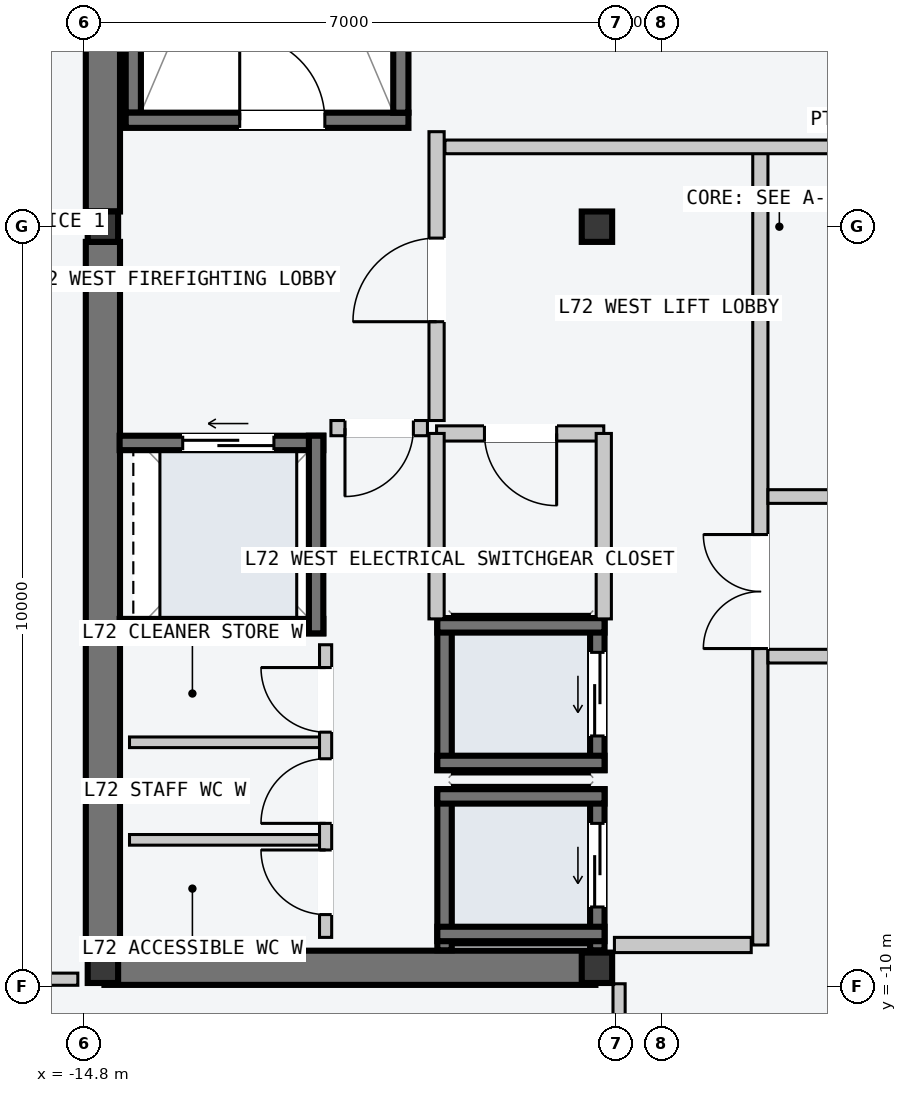
"""IFC4 building model, lengths in metres.
Left out: names, types, materials, properties, quantities, classifications, styles, units other than length and angle.
Written with IfcOpenShell. Run it as: python <this file> out.ifc"""

import sys

from ifc_helpers import new_model, si_unit, direction, frame, frame_2d, origin, origin_2d, place, context, subcontext, project, spatial, rectangle, i_section, extrude, element, fill, save


model = new_model("IFC4")
c1 = context("Model", 3, precision=1e-05, world=origin(), true_north=direction((0.0, 1.0)))
c2 = subcontext(c1, "Body", "Model", "MODEL_VIEW")
j1 = project(units=[si_unit("LENGTHUNIT", "METRE"), si_unit("PLANEANGLEUNIT", "RADIAN")], contexts=[c1])
p1 = place(None, origin())
s1 = spatial("IfcSite", under=j1, at=p1, CompositionType="ELEMENT")
p2 = place(p1, origin())
s2 = spatial("IfcBuilding", under=s1, at=p2, CompositionType="ELEMENT")
p3 = place(p2, frame((0.0, 0.0, 272.4)))
s3 = spatial("IfcBuildingStorey", under=s2, at=p3, CompositionType="ELEMENT", Elevation=272.4)
p4 = place(p3, frame((-14.53, -9.75, -0.2), z_axis=(0.0, 0.0, 1.0), x_axis=(1.0, 0.0, 0.0)))
e1 = element("IfcWall", 1, at=p4, inside=s3, PredefinedType="SHEAR", context=c2, shape_type="SweptSolid", body=[
    extrude(rectangle(XDim=6.46, YDim=0.45, at=frame_2d((3.23, 0.0))), origin(), (0.0, 0.0, 1.0), 3.6),
])
for number, where, z_axis, x_axis in (
    (2, (-14.55, -9.55, -0.2), (0.0, 0.0, 1.0), (0.0, 1.0, 0.0)),
    (3, (-14.55, 0.2, -0.2), (0.0, 0.0, 1.0), (0.0, 1.0, 0.0)),
):
    element("IfcWall", number, at=place(p3, frame(where, z_axis=z_axis, x_axis=x_axis)), inside=s3, PredefinedType="SHEAR", context=c2, shape_type="SweptSolid", body=[
        extrude(rectangle(XDim=9.35, YDim=0.45, at=frame_2d((4.675, 0.0))), origin(), (0.0, 0.0, 1.0), 3.6),
    ])
p5 = place(p3, frame((-14.15, 1.5, -0.2), z_axis=(0.0, 0.0, 1.0), x_axis=(0.0, 1.0, 0.0)))
e4 = element("IfcWall", 4, at=p5, inside=s3, PredefinedType="SOLIDWALL", context=c2, shape_type="SweptSolid", body=[
    extrude(rectangle(XDim=7.8, YDim=0.2, at=frame_2d((3.9, 0.0))), origin(), (0.0, 0.0, 1.0), 3.6),
])
p6 = place(p3, frame((-14.25, 1.4, -0.2), z_axis=(0.0, 0.0, 1.0), x_axis=(1.0, 0.0, 0.0)))
e5 = element("IfcWall", 5, at=p6, inside=s3, PredefinedType="SOLIDWALL", context=c2, shape_type="SweptSolid", body=[
    extrude(rectangle(XDim=3.72, YDim=0.2, at=frame_2d((1.86, 0.0))), origin(), (0.0, 0.0, 1.0), 3.6),
])
p7 = place(p6, frame((1.5, 0.0, 0.2)))
e6 = element("IfcOpeningElement", 6, at=p7, cuts=e5, PredefinedType="OPENING", context=c2, shape_type="SweptSolid", body=[
    extrude(rectangle(XDim=1.12, YDim=2.18, at=frame_2d((0.56, 1.09))), frame((0.0, 0.11, 0.0), z_axis=(0.0, -1.0, 0.0), x_axis=(1.0, 0.0, 0.0)), (0.0, 0.0, 1.0), 0.22),
])
p8 = place(p3, frame((-10.63, 1.5, -0.2), z_axis=(0.0, 0.0, 1.0), x_axis=(0.0, 1.0, 0.0)))
e7 = element("IfcWall", 7, at=p8, inside=s3, PredefinedType="SOLIDWALL", context=c2, shape_type="SweptSolid", body=[
    extrude(rectangle(XDim=7.8, YDim=0.2, at=frame_2d((3.9, 0.0))), origin(), (0.0, 0.0, 1.0), 3.6),
])
for number, where, z_axis, x_axis in (
    (8, (-14.55, -9.75, 0.0), (0.0, 0.0, 1.0), (1.0, 0.0, 0.0)),
    (9, (-14.55, 0.0, 0.0), (0.0, 0.0, 1.0), (1.0, 0.0, 0.0)),
    (10, (-8.05, -9.75, 0.0), (0.0, 0.0, 1.0), (1.0, 0.0, 0.0)),
    (11, (-8.05, 0.0, 0.0), (0.0, 0.0, 1.0), (1.0, 0.0, 0.0)),
):
    element("IfcColumn", number, at=place(p3, frame(where, z_axis=z_axis, x_axis=x_axis)), inside=s3, PredefinedType="COLUMN", context=c2, shape_type="SweptSolid", body=[
        extrude(i_section(OverallWidth=0.4, OverallDepth=0.4, WebThickness=0.013, FlangeThickness=0.021, at=origin_2d()), origin(), (0.0, 0.0, 1.0), 3.6),
    ])
p9 = place(p3, frame((-8.045, -9.52, -0.2), z_axis=(0.0, 0.0, 1.0), x_axis=(0.0, 1.0, 0.0)))
e12 = element("IfcWall", 12, at=p9, inside=s3, PredefinedType="SOLIDWALL", context=c2, shape_type="SweptSolid", body=[
    extrude(rectangle(XDim=2.12, YDim=0.19, at=frame_2d((1.06, 0.0))), origin(), (0.0, 0.0, 1.0), 3.6),
])
p10 = place(p9, frame((0.57, 0.0, 0.2)))
e13 = element("IfcOpeningElement", 13, at=p10, cuts=e12, PredefinedType="OPENING", context=c2, shape_type="SweptSolid", body=[
    extrude(rectangle(XDim=1.1, YDim=2.2, at=frame_2d((0.55, 1.1))), frame((0.0, 0.105, 0.0), z_axis=(0.0, -1.0, 0.0), x_axis=(1.0, 0.0, 0.0)), (0.0, 0.0, 1.0), 0.21),
])
p11 = place(p3, frame((-10.055, -9.52, -0.2), z_axis=(0.0, 0.0, 1.0), x_axis=(0.0, 1.0, 0.0)))
e14 = element("IfcWall", 14, at=p11, inside=s3, PredefinedType="SOLIDWALL", context=c2, shape_type="SweptSolid", body=[
    extrude(rectangle(XDim=2.12, YDim=0.19, at=frame_2d((1.06, 0.0))), origin(), (0.0, 0.0, 1.0), 3.6),
])
for number, where, z_axis, x_axis in (
    (15, (-10.15, -7.495, -0.2), (0.0, 0.0, 1.0), (1.0, 0.0, 0.0)),
    (16, (-10.15, -9.305, -0.2), (0.0, 0.0, 1.0), (1.0, 0.0, 0.0)),
):
    element("IfcWall", number, at=place(p3, frame(where, z_axis=z_axis, x_axis=x_axis)), inside=s3, PredefinedType="SOLIDWALL", context=c2, shape_type="SweptSolid", body=[
        extrude(rectangle(XDim=2.2, YDim=0.19, at=frame_2d((1.1, 0.0))), origin(), (0.0, 0.0, 1.0), 3.6),
    ])
p12 = place(p3, frame((-8.045, -7.15, -0.2), z_axis=(0.0, 0.0, 1.0), x_axis=(0.0, 1.0, 0.0)))
e17 = element("IfcWall", 17, at=p12, inside=s3, PredefinedType="SOLIDWALL", context=c2, shape_type="SweptSolid", body=[
    extrude(rectangle(XDim=2.0, YDim=0.19, at=frame_2d((1.0, 0.0))), origin(), (0.0, 0.0, 1.0), 3.6),
])
p13 = place(p12, frame((0.45, 0.0, 0.2)))
e18 = element("IfcOpeningElement", 18, at=p13, cuts=e17, PredefinedType="OPENING", context=c2, shape_type="SweptSolid", body=[
    extrude(rectangle(XDim=1.1, YDim=2.2, at=frame_2d((0.55, 1.1))), frame((0.0, 0.105, 0.0), z_axis=(0.0, -1.0, 0.0), x_axis=(1.0, 0.0, 0.0)), (0.0, 0.0, 1.0), 0.21),
])
p14 = place(p3, frame((-10.055, -7.15, -0.2), z_axis=(0.0, 0.0, 1.0), x_axis=(0.0, 1.0, 0.0)))
e19 = element("IfcWall", 19, at=p14, inside=s3, PredefinedType="SOLIDWALL", context=c2, shape_type="SweptSolid", body=[
    extrude(rectangle(XDim=2.0, YDim=0.19, at=frame_2d((1.0, 0.0))), origin(), (0.0, 0.0, 1.0), 3.6),
])
for number, where, z_axis, x_axis in (
    (20, (-10.15, -5.245, -0.2), (0.0, 0.0, 1.0), (1.0, 0.0, 0.0)),
    (21, (-10.15, -7.055, -0.2), (0.0, 0.0, 1.0), (1.0, 0.0, 0.0)),
):
    element("IfcWall", number, at=place(p3, frame(where, z_axis=z_axis, x_axis=x_axis)), inside=s3, PredefinedType="SOLIDWALL", context=c2, shape_type="SweptSolid", body=[
        extrude(rectangle(XDim=2.2, YDim=0.19, at=frame_2d((1.1, 0.0))), origin(), (0.0, 0.0, 1.0), 3.6),
    ])
p15 = place(p3, frame((-14.33, -2.845, -0.2), z_axis=(0.0, 0.0, 1.0), x_axis=(1.0, 0.0, 0.0)))
e22 = element("IfcWall", 22, at=p15, inside=s3, PredefinedType="SOLIDWALL", context=c2, shape_type="SweptSolid", body=[
    extrude(rectangle(XDim=2.68, YDim=0.19, at=frame_2d((1.34, 0.0))), origin(), (0.0, 0.0, 1.0), 3.6),
])
p16 = place(p15, frame((0.83, 0.0, 0.2)))
e23 = element("IfcOpeningElement", 23, at=p16, cuts=e22, PredefinedType="OPENING", context=c2, shape_type="SweptSolid", body=[
    extrude(rectangle(XDim=1.2, YDim=2.2, at=frame_2d((0.6, 1.1))), frame((0.0, 0.105, 0.0), z_axis=(0.0, -1.0, 0.0), x_axis=(1.0, 0.0, 0.0)), (0.0, 0.0, 1.0), 0.21),
])
p17 = place(p3, frame((-14.33, -5.255, -0.2), z_axis=(0.0, 0.0, 1.0), x_axis=(1.0, 0.0, 0.0)))
e24 = element("IfcWall", 24, at=p17, inside=s3, PredefinedType="SOLIDWALL", context=c2, shape_type="SweptSolid", body=[
    extrude(rectangle(XDim=2.68, YDim=0.19, at=frame_2d((1.34, 0.0))), origin(), (0.0, 0.0, 1.0), 3.6),
])
p18 = place(p3, frame((-11.745, -5.35, -0.2), z_axis=(0.0, 0.0, 1.0), x_axis=(0.0, 1.0, 0.0)))
e25 = element("IfcWall", 25, at=p18, inside=s3, PredefinedType="SOLIDWALL", context=c2, shape_type="SweptSolid", body=[
    extrude(rectangle(XDim=2.6, YDim=0.19, at=frame_2d((1.3, 0.0))), origin(), (0.0, 0.0, 1.0), 3.6),
])
p19 = place(p3, frame((-5.9, -9.45, 0.0), z_axis=(0.0, 0.0, 1.0), x_axis=(0.0, 1.0, 0.0)))
e26 = element("IfcWall", 26, at=p19, inside=s3, PredefinedType="PARTITIONING", context=c2, shape_type="SweptSolid", body=[
    extrude(rectangle(XDim=10.5, YDim=0.2, at=frame_2d((5.25, 0.0))), origin(), (0.0, 0.0, 1.0), 3.4),
])
p20 = place(p19, frame((3.9, 0.0, 0.0)))
e27 = element("IfcOpeningElement", 27, at=p20, cuts=e26, PredefinedType="OPENING", context=c2, shape_type="SweptSolid", body=[
    extrude(rectangle(XDim=1.5, YDim=2.2, at=frame_2d((0.75, 1.1))), frame((0.0, 0.11, 0.0), z_axis=(0.0, -1.0, 0.0), x_axis=(1.0, 0.0, 0.0)), (0.0, 0.0, 1.0), 0.22),
])
p21 = place(p3, frame((-6.02, -9.45, 0.0), z_axis=(0.0, 0.0, 1.0), x_axis=(-1.0, 0.0, 0.0)))
e28 = element("IfcWall", 28, at=p21, inside=s3, PredefinedType="PARTITIONING", context=c2, shape_type="SweptSolid", body=[
    extrude(rectangle(XDim=1.8, YDim=0.2, at=frame_2d((0.9, 0.0))), origin(), (0.0, 0.0, 1.0), 3.4),
])
p22 = place(p3, frame((-10.16, -2.55, 0.0), z_axis=(0.0, 0.0, 1.0), x_axis=(0.0, 1.0, 0.0)))
e29 = element("IfcWall", 29, at=p22, inside=s3, PredefinedType="PARTITIONING", context=c2, shape_type="SweptSolid", body=[
    extrude(rectangle(XDim=3.8, YDim=0.2, at=frame_2d((1.9, 0.0))), origin(), (0.0, 0.0, 1.0), 3.4),
])
p23 = place(p22, frame((1.3, 0.0, 0.0)))
e30 = element("IfcOpeningElement", 30, at=p23, cuts=e29, PredefinedType="OPENING", context=c2, shape_type="SweptSolid", body=[
    extrude(rectangle(XDim=1.1, YDim=2.15, at=frame_2d((0.55, 1.075))), frame((0.0, 0.11, 0.0), z_axis=(0.0, -1.0, 0.0), x_axis=(1.0, 0.0, 0.0)), (0.0, 0.0, 1.0), 0.22),
])
p24 = place(p3, frame((-10.28, -2.65, 0.0), z_axis=(0.0, 0.0, 1.0), x_axis=(-1.0, 0.0, 0.0)))
e31 = element("IfcWall", 31, at=p24, inside=s3, PredefinedType="PARTITIONING", context=c2, shape_type="SweptSolid", body=[
    extrude(rectangle(XDim=1.27, YDim=0.2, at=frame_2d((0.635, 0.0))), origin(), (0.0, 0.0, 1.0), 3.4),
])
p25 = place(p24, frame((0.185, 0.0, 0.0)))
e32 = element("IfcOpeningElement", 32, at=p25, cuts=e31, PredefinedType="OPENING", context=c2, shape_type="SweptSolid", body=[
    extrude(rectangle(XDim=0.9, YDim=2.15, at=frame_2d((0.45, 1.075))), frame((0.0, 0.11, 0.0), z_axis=(0.0, -1.0, 0.0), x_axis=(1.0, 0.0, 0.0)), (0.0, 0.0, 1.0), 0.22),
])
p26 = place(p3, frame((-7.96, -2.72, 0.0), z_axis=(0.0, 0.0, 1.0), x_axis=(-1.0, 0.0, 0.0)))
e33 = element("IfcWall", 33, at=p26, inside=s3, PredefinedType="PARTITIONING", context=c2, shape_type="SweptSolid", body=[
    extrude(rectangle(XDim=2.2, YDim=0.2, at=frame_2d((1.1, 0.0))), origin(), (0.0, 0.0, 1.0), 3.4),
])
p27 = place(p26, frame((0.62, 0.0, 0.0)))
e34 = element("IfcOpeningElement", 34, at=p27, cuts=e33, PredefinedType="OPENING", context=c2, shape_type="SweptSolid", body=[
    extrude(rectangle(XDim=0.95, YDim=2.1, at=frame_2d((0.475, 1.05))), frame((0.0, 0.11, 0.0), z_axis=(0.0, -1.0, 0.0), x_axis=(1.0, 0.0, 0.0)), (0.0, 0.0, 1.0), 0.22),
])
for number, where, z_axis, x_axis in (
    (35, (-7.96, -5.16, 0.0), (0.0, 0.0, 1.0), (0.0, 1.0, 0.0)),
    (36, (-10.16, -5.16, 0.0), (0.0, 0.0, 1.0), (0.0, 1.0, 0.0)),
):
    element("IfcWall", number, at=place(p3, frame(where, z_axis=z_axis, x_axis=x_axis)), inside=s3, PredefinedType="PARTITIONING", context=c2, shape_type="SweptSolid", body=[
        extrude(rectangle(XDim=2.44, YDim=0.2, at=frame_2d((1.22, 0.0))), origin(), (0.0, 0.0, 1.0), 3.4),
    ])
for number, where, z_axis, x_axis in (
    (37, (-11.7, -8.067, 0.0), (0.0, 0.0, 1.0), (-1.0, 0.0, 0.0)),
    (38, (-11.7, -6.783, 0.0), (0.0, 0.0, 1.0), (-1.0, 0.0, 0.0)),
):
    element("IfcWall", number, at=place(p3, frame(where, z_axis=z_axis, x_axis=x_axis)), inside=s3, PredefinedType="PARTITIONING", context=c2, shape_type="SweptSolid", body=[
        extrude(rectangle(XDim=2.5, YDim=0.14, at=frame_2d((1.25, 0.0))), origin(), (0.0, 0.0, 1.0), 3.4),
    ])
p28 = place(p3, frame((-11.62, -9.35, 0.0), z_axis=(0.0, 0.0, 1.0), x_axis=(0.0, 1.0, 0.0)))
e39 = element("IfcWall", 39, at=p28, inside=s3, PredefinedType="PARTITIONING", context=c2, shape_type="SweptSolid", body=[
    extrude(rectangle(XDim=3.85, YDim=0.16, at=frame_2d((1.925, 0.0))), origin(), (0.0, 0.0, 1.0), 3.4),
])
p29 = place(p28, frame((0.3, 0.0, 0.0)))
e40 = element("IfcOpeningElement", 40, at=p29, cuts=e39, PredefinedType="OPENING", context=c2, shape_type="SweptSolid", body=[
    extrude(rectangle(XDim=0.85, YDim=2.12, at=frame_2d((0.425, 1.06))), frame((0.0, 0.09, 0.0), z_axis=(0.0, -1.0, 0.0), x_axis=(1.0, 0.0, 0.0)), (0.0, 0.0, 1.0), 0.18),
])
p30 = place(p28, frame((1.5, 0.0, 0.0)))
e41 = element("IfcOpeningElement", 41, at=p30, cuts=e39, PredefinedType="OPENING", context=c2, shape_type="SweptSolid", body=[
    extrude(rectangle(XDim=0.85, YDim=2.12, at=frame_2d((0.425, 1.06))), frame((0.0, 0.09, 0.0), z_axis=(0.0, -1.0, 0.0), x_axis=(1.0, 0.0, 0.0)), (0.0, 0.0, 1.0), 0.18),
])
p31 = place(p28, frame((2.7, 0.0, 0.0)))
e42 = element("IfcOpeningElement", 42, at=p31, cuts=e39, PredefinedType="OPENING", context=c2, shape_type="SweptSolid", body=[
    extrude(rectangle(XDim=0.85, YDim=2.12, at=frame_2d((0.425, 1.06))), frame((0.0, 0.09, 0.0), z_axis=(0.0, -1.0, 0.0), x_axis=(1.0, 0.0, 0.0)), (0.0, 0.0, 1.0), 0.18),
])
p32 = place(p3, frame((-10.05, 1.05, 0.0), z_axis=(0.0, 0.0, 1.0), x_axis=(1.0, 0.0, 0.0)))
e43 = element("IfcWall", 43, at=p32, inside=s3, PredefinedType="PARTITIONING", context=c2, shape_type="SweptSolid", body=[
    extrude(rectangle(XDim=10.54, YDim=0.18, at=frame_2d((5.27, 0.0))), origin(), (0.0, 0.0, 1.0), 3.4),
])
for number, where, z_axis, x_axis in (
    (44, (-5.8, -3.55, 0.0), (0.0, 0.0, 1.0), (1.0, 0.0, 0.0)),
    (45, (-5.8, -5.65, 0.0), (0.0, 0.0, 1.0), (1.0, 0.0, 0.0)),
):
    element("IfcWall", number, at=place(p3, frame(where, z_axis=z_axis, x_axis=x_axis)), inside=s3, PredefinedType="PARTITIONING", context=c2, shape_type="SweptSolid", body=[
        extrude(rectangle(XDim=6.29, YDim=0.18, at=frame_2d((3.145, 0.0))), origin(), (0.0, 0.0, 1.0), 3.4),
    ])
p33 = place(p3, frame((-7.759, -17.56, 0.0), z_axis=(0.0, 0.0, 1.0), x_axis=(0.0, 1.0, 0.0)))
e46 = element("IfcWall", 46, at=p33, inside=s3, PredefinedType="PARTITIONING", context=c2, shape_type="SweptSolid", body=[
    extrude(rectangle(XDim=7.6, YDim=0.16, at=frame_2d((3.8, 0.0))), origin(), (0.0, 0.0, 1.0), 3.4),
])
p34 = place(p33, frame((1.34, 0.0, 0.0)))
e47 = element("IfcOpeningElement", 47, at=p34, cuts=e46, PredefinedType="OPENING", context=c2, shape_type="SweptSolid", body=[
    extrude(rectangle(XDim=0.96, YDim=2.18, at=frame_2d((0.48, 1.09))), frame((0.0, 0.09, 0.0), z_axis=(0.0, -1.0, 0.0), x_axis=(1.0, 0.0, 0.0)), (0.0, 0.0, 1.0), 0.18),
])
p35 = place(p3, frame((-18.56, -9.9, 0.0), z_axis=(0.0, 0.0, 1.0), x_axis=(1.0, 0.0, 0.0)))
e48 = element("IfcWall", 48, at=p35, inside=s3, PredefinedType="PARTITIONING", context=c2, shape_type="SweptSolid", body=[
    extrude(rectangle(XDim=3.68, YDim=0.16, at=frame_2d((1.84, 0.0))), origin(), (0.0, 0.0, 1.0), 3.4),
])
p36 = place(p35, frame((1.36, 0.0, 0.0)))
e49 = element("IfcOpeningElement", 49, at=p36, cuts=e48, PredefinedType="OPENING", context=c2, shape_type="SweptSolid", body=[
    extrude(rectangle(XDim=0.96, YDim=2.18, at=frame_2d((0.48, 1.09))), frame((0.0, 0.09, 0.0), z_axis=(0.0, -1.0, 0.0), x_axis=(1.0, 0.0, 0.0)), (0.0, 0.0, 1.0), 0.18),
])
p37 = place(p7, origin())
e50 = element("IfcDoor", 50, at=p37, inside=s3, OperationType="SINGLE_SWING_LEFT", PredefinedType="DOOR", context=c2, shape_type="SweptSolid", body=[
    extrude(rectangle(XDim=1.12, YDim=2.18, at=frame_2d((0.56, 1.09))), frame((0.0, 0.025, 0.0), z_axis=(0.0, -1.0, 0.0), x_axis=(1.0, 0.0, 0.0)), (0.0, 0.0, 1.0), 0.05),
])
fill(e6, e50)
p38 = place(p10, origin())
e51 = element("IfcDoor", 51, at=p38, inside=s3, OperationType="SLIDING_TO_LEFT", PredefinedType="DOOR", context=c2, shape_type="SweptSolid", body=[
    extrude(rectangle(XDim=1.1, YDim=2.2, at=frame_2d((0.55, 1.1))), frame((0.0, 0.025, 0.0), z_axis=(0.0, -1.0, 0.0), x_axis=(1.0, 0.0, 0.0)), (0.0, 0.0, 1.0), 0.05),
])
fill(e13, e51)
p39 = place(p13, origin())
e52 = element("IfcDoor", 52, at=p39, inside=s3, OperationType="SLIDING_TO_LEFT", PredefinedType="DOOR", context=c2, shape_type="SweptSolid", body=[
    extrude(rectangle(XDim=1.1, YDim=2.2, at=frame_2d((0.55, 1.1))), frame((0.0, 0.025, 0.0), z_axis=(0.0, -1.0, 0.0), x_axis=(1.0, 0.0, 0.0)), (0.0, 0.0, 1.0), 0.05),
])
fill(e18, e52)
p40 = place(p16, origin())
e53 = element("IfcDoor", 53, at=p40, inside=s3, OperationType="SLIDING_TO_LEFT", PredefinedType="DOOR", context=c2, shape_type="SweptSolid", body=[
    extrude(rectangle(XDim=1.2, YDim=2.2, at=frame_2d((0.6, 1.1))), frame((0.0, 0.025, 0.0), z_axis=(0.0, -1.0, 0.0), x_axis=(1.0, 0.0, 0.0)), (0.0, 0.0, 1.0), 0.05),
])
fill(e23, e53)
p41 = place(p20, origin())
e54 = element("IfcDoor", 54, at=p41, inside=s3, OperationType="DOUBLE_DOOR_SINGLE_SWING", PredefinedType="DOOR", context=c2, shape_type="SweptSolid", body=[
    extrude(rectangle(XDim=1.5, YDim=2.2, at=frame_2d((0.75, 1.1))), frame((0.0, 0.025, 0.0), z_axis=(0.0, -1.0, 0.0), x_axis=(1.0, 0.0, 0.0)), (0.0, 0.0, 1.0), 0.05),
])
fill(e27, e54)
p42 = place(p23, origin())
e55 = element("IfcDoor", 55, at=p42, inside=s3, OperationType="SINGLE_SWING_LEFT", PredefinedType="DOOR", context=c2, shape_type="SweptSolid", body=[
    extrude(rectangle(XDim=1.1, YDim=2.15, at=frame_2d((0.55, 1.075))), frame((0.0, 0.025, 0.0), z_axis=(0.0, -1.0, 0.0), x_axis=(1.0, 0.0, 0.0)), (0.0, 0.0, 1.0), 0.05),
])
fill(e30, e55)
p43 = place(p25, origin())
e56 = element("IfcDoor", 56, at=p43, inside=s3, OperationType="SINGLE_SWING_RIGHT", PredefinedType="DOOR", context=c2, shape_type="SweptSolid", body=[
    extrude(rectangle(XDim=0.9, YDim=2.15, at=frame_2d((0.45, 1.075))), frame((0.0, 0.025, 0.0), z_axis=(0.0, -1.0, 0.0), x_axis=(1.0, 0.0, 0.0)), (0.0, 0.0, 1.0), 0.05),
])
fill(e32, e56)
p44 = place(p27, origin())
e57 = element("IfcDoor", 57, at=p44, inside=s3, OperationType="SINGLE_SWING_LEFT", PredefinedType="DOOR", context=c2, shape_type="SweptSolid", body=[
    extrude(rectangle(XDim=0.95, YDim=2.1, at=frame_2d((0.475, 1.05))), frame((0.0, 0.025, 0.0), z_axis=(0.0, -1.0, 0.0), x_axis=(1.0, 0.0, 0.0)), (0.0, 0.0, 1.0), 0.05),
])
fill(e34, e57)
p45 = place(p29, origin())
e58 = element("IfcDoor", 58, at=p45, inside=s3, OperationType="SINGLE_SWING_RIGHT", PredefinedType="DOOR", context=c2, shape_type="SweptSolid", body=[
    extrude(rectangle(XDim=0.85, YDim=2.12, at=frame_2d((0.425, 1.06))), frame((0.0, 0.025, 0.0), z_axis=(0.0, -1.0, 0.0), x_axis=(1.0, 0.0, 0.0)), (0.0, 0.0, 1.0), 0.05),
])
fill(e40, e58)
p46 = place(p30, origin())
e59 = element("IfcDoor", 59, at=p46, inside=s3, OperationType="SINGLE_SWING_LEFT", PredefinedType="DOOR", context=c2, shape_type="SweptSolid", body=[
    extrude(rectangle(XDim=0.85, YDim=2.12, at=frame_2d((0.425, 1.06))), frame((0.0, 0.025, 0.0), z_axis=(0.0, -1.0, 0.0), x_axis=(1.0, 0.0, 0.0)), (0.0, 0.0, 1.0), 0.05),
])
fill(e41, e59)
p47 = place(p31, origin())
e60 = element("IfcDoor", 60, at=p47, inside=s3, OperationType="SINGLE_SWING_RIGHT", PredefinedType="DOOR", context=c2, shape_type="SweptSolid", body=[
    extrude(rectangle(XDim=0.85, YDim=2.12, at=frame_2d((0.425, 1.06))), frame((0.0, 0.025, 0.0), z_axis=(0.0, -1.0, 0.0), x_axis=(1.0, 0.0, 0.0)), (0.0, 0.0, 1.0), 0.05),
])
fill(e42, e60)
save(model, sys.argv[1])
